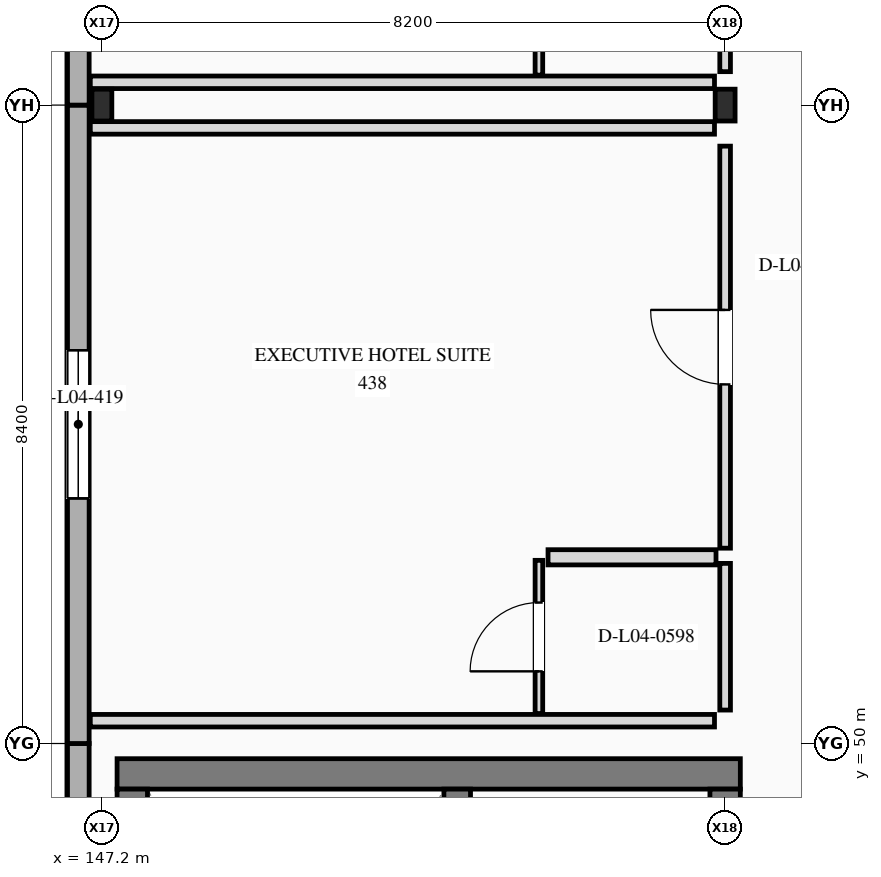
"""IFC4 building model, lengths in metres.
Left out: names, types, materials, properties, quantities, classifications, styles, units other than length and angle.
Written with IfcOpenShell. Run it as: python <this file> out.ifc"""

import sys

from ifc_helpers import new_model, si_unit, direction, frame, frame_2d, origin, origin_2d, place, context, subcontext, project, spatial, rectangle, i_section, extrude, element, fill, save


model = new_model("IFC4")
c1 = context("Model", 3, precision=1e-05, world=origin(), true_north=direction((0.0, 1.0)))
c2 = subcontext(c1, "Body", "Model", "MODEL_VIEW")
j1 = project(units=[si_unit("LENGTHUNIT", "METRE"), si_unit("PLANEANGLEUNIT", "RADIAN")], contexts=[c1])
p1 = place(None, origin())
s1 = spatial("IfcSite", under=j1, at=p1, CompositionType="ELEMENT")
p2 = place(p1, origin())
s2 = spatial("IfcBuilding", under=s1, at=p2, CompositionType="ELEMENT")
p3 = place(p2, frame((0.0, 0.0, 19.5)))
s3 = spatial("IfcBuildingStorey", under=s2, at=p3, CompositionType="ELEMENT", Elevation=19.5)
for number, where, z_axis, x_axis in (
    (1, (147.2, 58.4, 0.0), (0.0, 0.0, 1.0), (1.0, 0.0, 0.0)),
    (2, (155.4, 58.4, 0.0), (0.0, 0.0, 1.0), (1.0, 0.0, 0.0)),
):
    element("IfcColumn", number, at=place(p3, frame(where, z_axis=z_axis, x_axis=x_axis)), inside=s3, PredefinedType="COLUMN", context=c2, shape_type="SweptSolid", body=[
        extrude(i_section(OverallWidth=0.262, OverallDepth=0.419, WebThickness=0.012, FlangeThickness=0.019, at=origin_2d()), origin(), (0.0, 0.0, 1.0), 3.9),
    ])
p4 = place(p3, frame((146.89, 41.6, 0.0), z_axis=(0.0, 0.0, 1.0), x_axis=(0.0, 1.0, 0.0)))
e3 = element("IfcWall", 3, at=p4, inside=s3, PredefinedType="STANDARD", context=c2, shape_type="SweptSolid", body=[
    extrude(rectangle(XDim=8.4, YDim=0.285, at=frame_2d((4.2, 0.0))), origin(), (0.0, 0.0, 1.0), 3.9),
])
p5 = place(p3, frame((146.89, 50.0, 0.0), z_axis=(0.0, 0.0, 1.0), x_axis=(0.0, 1.0, 0.0)))
e4 = element("IfcWall", 4, at=p5, inside=s3, PredefinedType="STANDARD", context=c2, shape_type="SweptSolid", body=[
    extrude(rectangle(XDim=8.4, YDim=0.285, at=frame_2d((4.2, 0.0))), origin(), (0.0, 0.0, 1.0), 3.9),
])
p6 = place(p5, frame((3.225, 0.0, 0.85)))
e5 = element("IfcOpeningElement", 5, at=p6, cuts=e4, PredefinedType="OPENING", context=c2, shape_type="SweptSolid", body=[
    extrude(rectangle(XDim=1.95, YDim=1.85, at=frame_2d((0.975, 0.925))), frame((0.0, 0.152, 0.0), z_axis=(0.0, -1.0, 0.0), x_axis=(1.0, 0.0, 0.0)), (0.0, 0.0, 1.0), 0.305),
])
p7 = place(p3, frame((146.89, 58.4, 0.0), z_axis=(0.0, 0.0, 1.0), x_axis=(0.0, 1.0, 0.0)))
e6 = element("IfcWall", 6, at=p7, inside=s3, PredefinedType="STANDARD", context=c2, shape_type="SweptSolid", body=[
    extrude(rectangle(XDim=8.71, YDim=0.285, at=frame_2d((4.355, 0.0))), origin(), (0.0, 0.0, 1.0), 3.9),
])
p8 = place(p7, frame((3.2, 0.0, 0.85)))
e7 = element("IfcOpeningElement", 7, at=p8, cuts=e6, PredefinedType="OPENING", context=c2, shape_type="SweptSolid", body=[
    extrude(rectangle(XDim=2.0, YDim=1.65, at=frame_2d((1.0, 0.825))), frame((0.0, 0.152, 0.0), z_axis=(0.0, -1.0, 0.0), x_axis=(1.0, 0.0, 0.0)), (0.0, 0.0, 1.0), 0.305),
])
p9 = place(p3, frame((155.6, 49.6, 0.0), z_axis=(0.0, 0.0, 1.0), x_axis=(-1.0, 0.0, 0.0)))
e8 = element("IfcWall", 8, at=p9, inside=s3, PredefinedType="SHEAR", context=c2, shape_type="SweptSolid", body=[
    extrude(rectangle(XDim=8.2, YDim=0.4, at=frame_2d((4.1, 0.0))), origin(), (0.0, 0.0, 1.0), 3.9),
])
p10 = place(p3, frame((147.6, 49.4, 0.0), z_axis=(0.0, 0.0, 1.0), x_axis=(0.0, -1.0, 0.0)))
e9 = element("IfcWall", 9, at=p10, inside=s3, PredefinedType="SHEAR", context=c2, shape_type="SweptSolid", body=[
    extrude(rectangle(XDim=9.4, YDim=0.4, at=frame_2d((4.7, 0.0))), origin(), (0.0, 0.0, 1.0), 3.9),
])
p11 = place(p3, frame((155.4, 40.0, 0.0), z_axis=(0.0, 0.0, 1.0), x_axis=(0.0, 1.0, 0.0)))
e10 = element("IfcWall", 10, at=p11, inside=s3, PredefinedType="SHEAR", context=c2, shape_type="SweptSolid", body=[
    extrude(rectangle(XDim=9.4, YDim=0.4, at=frame_2d((4.7, 0.0))), origin(), (0.0, 0.0, 1.0), 3.9),
])
p12 = place(p11, frame((1.05, 0.0, 0.0)))
e11 = element("IfcOpeningElement", 11, at=p12, cuts=e10, PredefinedType="OPENING", context=c2, shape_type="SweptSolid", body=[
    extrude(rectangle(XDim=1.1, YDim=2.2, at=frame_2d((0.55, 1.1))), frame((0.0, 0.21, 0.0), z_axis=(0.0, -1.0, 0.0), x_axis=(1.0, 0.0, 0.0)), (0.0, 0.0, 1.0), 0.42),
])
p13 = place(p11, frame((3.95, 0.0, 0.0)))
e12 = element("IfcOpeningElement", 12, at=p13, cuts=e10, PredefinedType="OPENING", context=c2, shape_type="SweptSolid", body=[
    extrude(rectangle(XDim=1.1, YDim=2.2, at=frame_2d((0.55, 1.1))), frame((0.0, 0.21, 0.0), z_axis=(0.0, -1.0, 0.0), x_axis=(1.0, 0.0, 0.0)), (0.0, 0.0, 1.0), 0.42),
])
p14 = place(p11, frame((6.875, 0.0, 0.0)))
e13 = element("IfcOpeningElement", 13, at=p14, cuts=e10, PredefinedType="OPENING", context=c2, shape_type="SweptSolid", body=[
    extrude(rectangle(XDim=1.35, YDim=2.3, at=frame_2d((0.675, 1.15))), frame((0.0, 0.21, 0.0), z_axis=(0.0, -1.0, 0.0), x_axis=(1.0, 0.0, 0.0)), (0.0, 0.0, 1.0), 0.42),
])
p15 = place(p3, frame((151.875, 40.0, 0.0), z_axis=(0.0, 0.0, 1.0), x_axis=(0.0, 1.0, 0.0)))
e14 = element("IfcWall", 14, at=p15, inside=s3, PredefinedType="SHEAR", context=c2, shape_type="SweptSolid", body=[
    extrude(rectangle(XDim=9.4, YDim=0.35, at=frame_2d((4.7, 0.0))), origin(), (0.0, 0.0, 1.0), 3.9),
])
p16 = place(p3, frame((155.4, 50.44, 0.0), z_axis=(0.0, 0.0, 1.0), x_axis=(0.0, 1.0, 0.0)))
e15 = element("IfcWall", 15, at=p16, inside=s3, PredefinedType="PARTITIONING", context=c2, shape_type="SweptSolid", body=[
    extrude(rectangle(XDim=1.93, YDim=0.14, at=frame_2d((0.965, 0.0))), origin(), (0.0, 0.0, 1.0), 2.975),
])
p17 = place(p3, frame((155.4, 52.57, 0.0), z_axis=(0.0, 0.0, 1.0), x_axis=(0.0, 1.0, 0.0)))
e16 = element("IfcWall", 16, at=p17, inside=s3, PredefinedType="PARTITIONING", context=c2, shape_type="SweptSolid", body=[
    extrude(rectangle(XDim=5.29, YDim=0.14, at=frame_2d((2.645, 0.0))), origin(), (0.0, 0.0, 1.0), 2.975),
])
p18 = place(p17, frame((2.155, 0.0, 0.0)))
e17 = element("IfcOpeningElement", 17, at=p18, cuts=e16, PredefinedType="OPENING", context=c2, shape_type="SweptSolid", body=[
    extrude(rectangle(XDim=0.98, YDim=2.35, at=frame_2d((0.49, 1.175))), frame((0.0, 0.08, 0.0), z_axis=(0.0, -1.0, 0.0), x_axis=(1.0, 0.0, 0.0)), (0.0, 0.0, 1.0), 0.16),
])
p19 = place(p3, frame((147.048, 50.3, 0.0), z_axis=(0.0, 0.0, 1.0), x_axis=(1.0, 0.0, 0.0)))
e18 = element("IfcWall", 18, at=p19, inside=s3, PredefinedType="PARTITIONING", context=c2, shape_type="SweptSolid", body=[
    extrude(rectangle(XDim=8.212, YDim=0.165, at=frame_2d((4.106, 0.0))), origin(), (0.0, 0.0, 1.0), 3.585),
])
p20 = place(p3, frame((147.048, 58.1, 0.0), z_axis=(0.0, 0.0, 1.0), x_axis=(1.0, 0.0, 0.0)))
e19 = element("IfcWall", 19, at=p20, inside=s3, PredefinedType="PARTITIONING", context=c2, shape_type="SweptSolid", body=[
    extrude(rectangle(XDim=8.212, YDim=0.165, at=frame_2d((4.106, 0.0))), origin(), (0.0, 0.0, 1.0), 2.998),
])
p21 = place(p3, frame((153.07, 52.45, 0.0), z_axis=(0.0, 0.0, 1.0), x_axis=(1.0, 0.0, 0.0)))
e20 = element("IfcWall", 20, at=p21, inside=s3, PredefinedType="PLUMBINGWALL", context=c2, shape_type="SweptSolid", body=[
    extrude(rectangle(XDim=2.21, YDim=0.2, at=frame_2d((1.105, 0.0))), origin(), (0.0, 0.0, 1.0), 3.585),
])
p22 = place(p3, frame((152.95, 50.395, 0.0), z_axis=(0.0, 0.0, 1.0), x_axis=(0.0, 1.0, 0.0)))
e21 = element("IfcWall", 21, at=p22, inside=s3, PredefinedType="PARTITIONING", context=c2, shape_type="SweptSolid", body=[
    extrude(rectangle(XDim=2.015, YDim=0.1, at=frame_2d((1.008, 0.0))), origin(), (0.0, 0.0, 1.0), 3.585),
])
p23 = place(p22, frame((0.555, 0.0, 0.0)))
e22 = element("IfcOpeningElement", 22, at=p23, cuts=e21, PredefinedType="OPENING", context=c2, shape_type="SweptSolid", body=[
    extrude(rectangle(XDim=0.905, YDim=2.1, at=frame_2d((0.453, 1.05))), frame((0.0, 0.06, 0.0), z_axis=(0.0, -1.0, 0.0), x_axis=(1.0, 0.0, 0.0)), (0.0, 0.0, 1.0), 0.12),
])
p24 = place(p3, frame((155.4, 58.84, 0.0), z_axis=(0.0, 0.0, 1.0), x_axis=(0.0, 1.0, 0.0)))
e23 = element("IfcWall", 23, at=p24, inside=s3, PredefinedType="PARTITIONING", context=c2, shape_type="SweptSolid", body=[
    extrude(rectangle(XDim=1.93, YDim=0.14, at=frame_2d((0.965, 0.0))), origin(), (0.0, 0.0, 1.0), 3.059),
])
p25 = place(p3, frame((147.048, 58.7, 0.0), z_axis=(0.0, 0.0, 1.0), x_axis=(1.0, 0.0, 0.0)))
e24 = element("IfcWall", 24, at=p25, inside=s3, PredefinedType="PARTITIONING", context=c2, shape_type="SweptSolid", body=[
    extrude(rectangle(XDim=8.212, YDim=0.165, at=frame_2d((4.106, 0.0))), origin(), (0.0, 0.0, 1.0), 2.998),
])
p26 = place(p3, frame((152.95, 58.794, 0.0), z_axis=(0.0, 0.0, 1.0), x_axis=(0.0, 1.0, 0.0)))
e25 = element("IfcWall", 25, at=p26, inside=s3, PredefinedType="PARTITIONING", context=c2, shape_type="SweptSolid", body=[
    extrude(rectangle(XDim=2.016, YDim=0.1, at=frame_2d((1.008, 0.0))), origin(), (0.0, 0.0, 1.0), 3.193),
])
p27 = place(p26, frame((0.53, 0.0, 0.0)))
e26 = element("IfcOpeningElement", 26, at=p27, cuts=e25, PredefinedType="OPENING", context=c2, shape_type="SweptSolid", body=[
    extrude(rectangle(XDim=0.955, YDim=2.14, at=frame_2d((0.478, 1.07))), frame((0.0, 0.06, 0.0), z_axis=(0.0, -1.0, 0.0), x_axis=(1.0, 0.0, 0.0)), (0.0, 0.0, 1.0), 0.12),
])
p28 = place(p6, origin())
e27 = element("IfcWindow", 27, at=p28, inside=s3, PartitioningType="SINGLE_PANEL", PredefinedType="WINDOW", context=c2, shape_type="SweptSolid", body=[
    extrude(rectangle(XDim=1.95, YDim=1.85, at=frame_2d((0.975, 0.925))), frame((0.0, 0.03, 0.0), z_axis=(0.0, -1.0, 0.0), x_axis=(1.0, 0.0, 0.0)), (0.0, 0.0, 1.0), 0.06),
])
fill(e5, e27)
p29 = place(p18, origin())
e28 = element("IfcDoor", 28, at=p29, inside=s3, OperationType="SINGLE_SWING_RIGHT", PredefinedType="DOOR", context=c2, shape_type="SweptSolid", body=[
    extrude(rectangle(XDim=0.98, YDim=2.35, at=frame_2d((0.49, 1.175))), frame((0.0, 0.025, 0.0), z_axis=(0.0, -1.0, 0.0), x_axis=(1.0, 0.0, 0.0)), (0.0, 0.0, 1.0), 0.05),
])
fill(e17, e28)
p30 = place(p23, origin())
e29 = element("IfcDoor", 29, at=p30, inside=s3, OperationType="SINGLE_SWING_LEFT", PredefinedType="DOOR", context=c2, shape_type="SweptSolid", body=[
    extrude(rectangle(XDim=0.905, YDim=2.1, at=frame_2d((0.453, 1.05))), frame((0.0, 0.025, 0.0), z_axis=(0.0, -1.0, 0.0), x_axis=(1.0, 0.0, 0.0)), (0.0, 0.0, 1.0), 0.05),
])
fill(e22, e29)
save(model, sys.argv[1])
